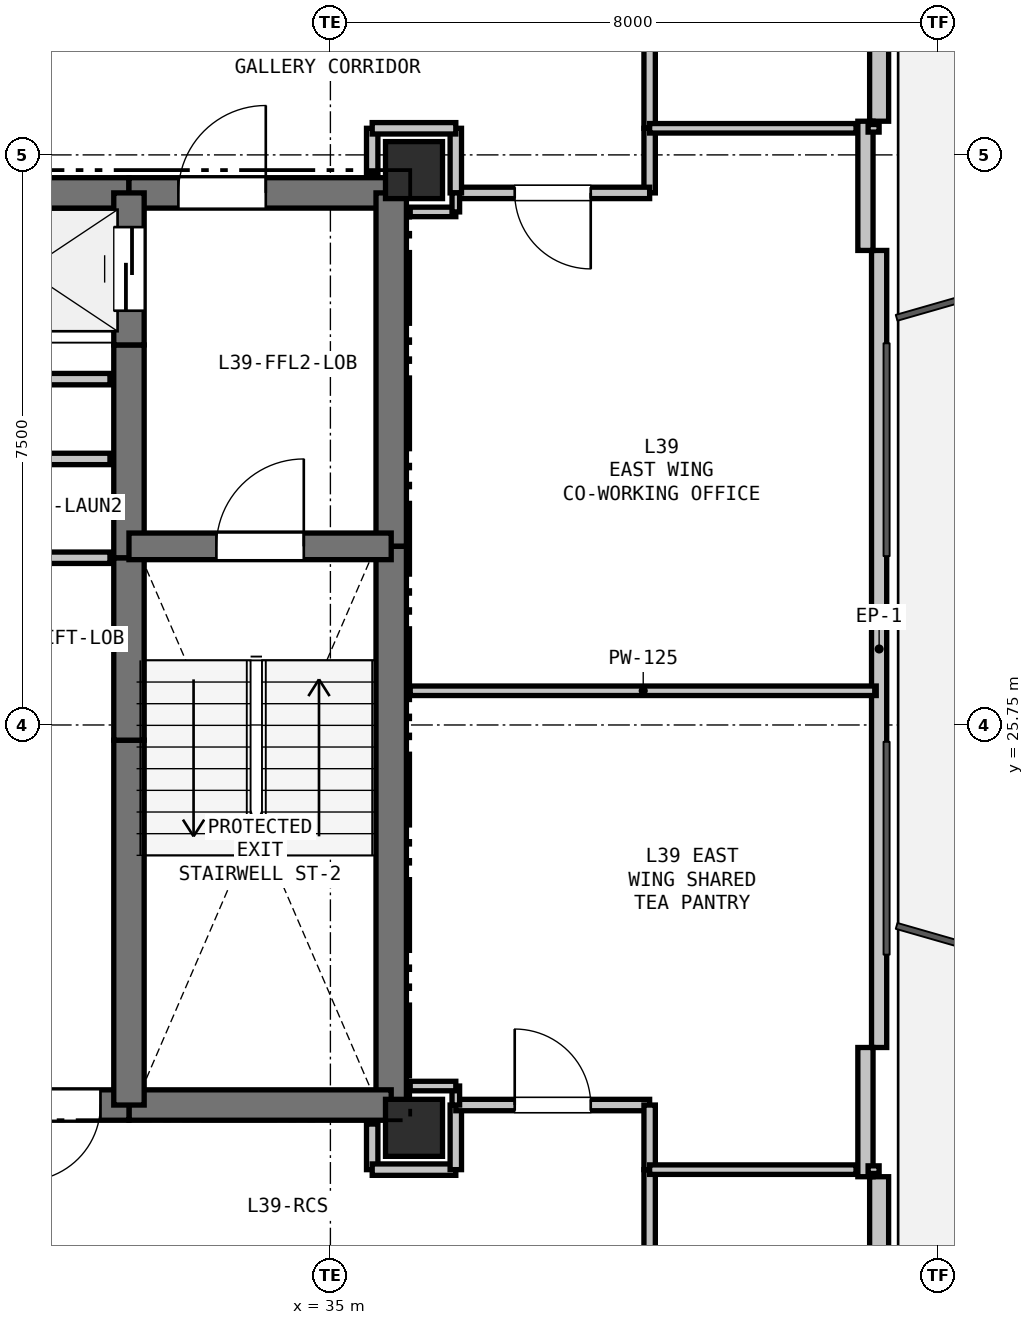
"""IFC4 building model, lengths in metres.
Left out: names, types, materials, properties, quantities, classifications, styles, units other than length and angle.
Written with IfcOpenShell. Run it as: python <this file> out.ifc"""

import sys

from ifc_helpers import new_model, si_unit, direction, frame, frame_2d, origin, origin_2d, place, context, subcontext, project, spatial, rectangle, extrude, element, fill, save


model = new_model("IFC4")
c1 = context("Model", 3, precision=1e-05, world=origin(), true_north=direction((0.0, 1.0)))
c2 = subcontext(c1, "Body", "Model", "MODEL_VIEW")
j1 = project(units=[si_unit("LENGTHUNIT", "METRE"), si_unit("PLANEANGLEUNIT", "RADIAN")], contexts=[c1])
p1 = place(None, origin())
s1 = spatial("IfcSite", under=j1, at=p1, CompositionType="ELEMENT")
p2 = place(p1, origin())
s2 = spatial("IfcBuilding", under=s1, at=p2, CompositionType="ELEMENT")
p3 = place(p2, frame((0.0, 0.0, 141.0)))
s3 = spatial("IfcBuildingStorey", under=s2, at=p3, CompositionType="ELEMENT", Elevation=141.0)
for number, where, z_axis, x_axis in (
    (1, (36.1, 33.05, 0.0), (0.0, 0.0, 1.0), (1.0, 0.0, 0.0)),
    (2, (36.1, 20.45, 0.0), (0.0, 0.0, 1.0), (1.0, 0.0, 0.0)),
):
    element("IfcColumn", number, at=place(p3, frame(where, z_axis=z_axis, x_axis=x_axis)), inside=s3, PredefinedType="COLUMN", context=c2, shape_type="SweptSolid", body=[
        extrude(rectangle(XDim=0.75, YDim=0.75, at=origin_2d()), origin(), (0.0, 0.0, 1.0), 3.3),
    ])
p4 = place(p3, frame((42.219, 44.879, 0.0), z_axis=(0.0, 0.0, 1.0), x_axis=(0.0, -1.0, 0.0)))
e3 = element("IfcWall", 3, at=p4, inside=s3, PredefinedType="SOLIDWALL", context=c2, shape_type="SweptSolid", body=[
    extrude(rectangle(XDim=11.186, YDim=0.25, at=frame_2d((5.593, 0.0))), origin(), (0.0, 0.0, 1.0), 2.68),
])
p5 = place(p4, frame((8.109, 0.0, 0.0)))
e4 = element("IfcOpeningElement", 4, at=p5, cuts=e3, PredefinedType="OPENING", context=c2, shape_type="SweptSolid", body=[
    extrude(rectangle(XDim=1.0, YDim=2.1, at=frame_2d((0.5, 1.05))), frame((0.0, 0.135, 0.0), z_axis=(0.0, -1.0, 0.0), x_axis=(1.0, 0.0, 0.0)), (0.0, 0.0, 1.0), 0.27),
])
p6 = place(p3, frame((42.219, 31.993, 0.0), z_axis=(0.0, 0.0, 1.0), x_axis=(0.0, -1.0, 0.0)))
e5 = element("IfcWall", 5, at=p6, inside=s3, PredefinedType="PARAPET", context=c2, shape_type="SweptSolid", body=[
    extrude(rectangle(XDim=10.486, YDim=0.2, at=frame_2d((5.243, 0.0))), origin(), (0.0, 0.0, 1.0), 0.2),
])
p7 = place(p3, frame((42.219, 19.807, 0.0), z_axis=(0.0, 0.0, 1.0), x_axis=(0.0, -1.0, 0.0)))
e6 = element("IfcWall", 6, at=p7, inside=s3, PredefinedType="SOLIDWALL", context=c2, shape_type="SweptSolid", body=[
    extrude(rectangle(XDim=11.186, YDim=0.25, at=frame_2d((5.593, 0.0))), origin(), (0.0, 0.0, 1.0), 2.68),
])
p8 = place(p7, frame((9.227, 0.0, 0.9)))
e7 = element("IfcOpeningElement", 7, at=p8, cuts=e6, PredefinedType="OPENING", context=c2, shape_type="SweptSolid", body=[
    extrude(rectangle(XDim=1.2, YDim=1.4, at=frame_2d((0.6, 0.7))), frame((0.0, 0.135, 0.0), z_axis=(0.0, -1.0, 0.0), x_axis=(1.0, 0.0, 0.0)), (0.0, 0.0, 1.0), 0.27),
])
for number, where, z_axis, x_axis in (
    (8, (42.039, 33.693, 0.0), (0.0, 0.0, 1.0), (0.0, -1.0, 0.0)),
    (9, (42.039, 21.507, 0.0), (0.0, 0.0, 1.0), (0.0, -1.0, 0.0)),
):
    element("IfcWall", number, at=place(p3, frame(where, z_axis=z_axis, x_axis=x_axis)), inside=s3, PredefinedType="PARAPET", context=c2, shape_type="SweptSolid", body=[
        extrude(rectangle(XDim=1.7, YDim=0.2, at=frame_2d((0.85, 0.0))), origin(), (0.0, 0.0, 1.0), 2.68),
    ])
p9 = place(p3, frame((29.65, 32.75, 0.0), z_axis=(0.0, 0.0, 1.0), x_axis=(1.0, 0.0, 0.0)))
e10 = element("IfcWall", 10, at=p9, inside=s3, PredefinedType="SHEAR", context=c2, shape_type="SweptSolid", body=[
    extrude(rectangle(XDim=2.7, YDim=0.4, at=frame_2d((1.35, 0.0))), origin(), (0.0, 0.0, 1.0), 3.06),
])
p10 = place(p3, frame((32.35, 32.75, 0.0), z_axis=(0.0, 0.0, 1.0), x_axis=(1.0, 0.0, 0.0)))
e11 = element("IfcWall", 11, at=p10, inside=s3, PredefinedType="SHEAR", context=c2, shape_type="SweptSolid", body=[
    extrude(rectangle(XDim=3.45, YDim=0.4, at=frame_2d((1.725, 0.0))), origin(), (0.0, 0.0, 1.0), 3.06),
])
p11 = place(p10, frame((0.65, 0.0, 0.0)))
e12 = element("IfcOpeningElement", 12, at=p11, cuts=e11, PredefinedType="OPENING", context=c2, shape_type="SweptSolid", body=[
    extrude(rectangle(XDim=1.15, YDim=2.15, at=frame_2d((0.575, 1.075))), frame((0.0, 0.21, 0.0), z_axis=(0.0, -1.0, 0.0), x_axis=(1.0, 0.0, 0.0)), (0.0, 0.0, 1.0), 0.42),
])
p12 = place(p3, frame((35.8, 32.75, 0.0), z_axis=(0.0, 0.0, 1.0), x_axis=(0.0, -1.0, 0.0)))
e13 = element("IfcWall", 13, at=p12, inside=s3, PredefinedType="SHEAR", context=c2, shape_type="SweptSolid", body=[
    extrude(rectangle(XDim=4.65, YDim=0.4, at=frame_2d((2.325, 0.0))), origin(), (0.0, 0.0, 1.0), 3.06),
])
p13 = place(p3, frame((35.8, 28.1, 0.0), z_axis=(0.0, 0.0, 1.0), x_axis=(0.0, -1.0, 0.0)))
e14 = element("IfcWall", 14, at=p13, inside=s3, PredefinedType="SHEAR", context=c2, shape_type="SweptSolid", body=[
    extrude(rectangle(XDim=7.35, YDim=0.4, at=frame_2d((3.675, 0.0))), origin(), (0.0, 0.0, 1.0), 3.06),
])
p14 = place(p3, frame((35.8, 20.75, 0.0), z_axis=(0.0, 0.0, 1.0), x_axis=(-1.0, 0.0, 0.0)))
e15 = element("IfcWall", 15, at=p14, inside=s3, PredefinedType="SHEAR", context=c2, shape_type="SweptSolid", body=[
    extrude(rectangle(XDim=3.45, YDim=0.4, at=frame_2d((1.725, 0.0))), origin(), (0.0, 0.0, 1.0), 3.06),
])
p15 = place(p3, frame((32.35, 20.75, 0.0), z_axis=(0.0, 0.0, 1.0), x_axis=(-1.0, 0.0, 0.0)))
e16 = element("IfcWall", 16, at=p15, inside=s3, PredefinedType="SHEAR", context=c2, shape_type="SweptSolid", body=[
    extrude(rectangle(XDim=1.75, YDim=0.4, at=frame_2d((0.875, 0.0))), origin(), (0.0, 0.0, 1.0), 3.06),
])
p16 = place(p15, frame((0.375, 0.0, 0.0)))
e17 = element("IfcOpeningElement", 17, at=p16, cuts=e16, PredefinedType="OPENING", context=c2, shape_type="SweptSolid", body=[
    extrude(rectangle(XDim=1.0, YDim=2.15, at=frame_2d((0.5, 1.075))), frame((0.0, 0.21, 0.0), z_axis=(0.0, -1.0, 0.0), x_axis=(1.0, 0.0, 0.0)), (0.0, 0.0, 1.0), 0.42),
])
p17 = place(p3, frame((32.35, 20.75, 0.0), z_axis=(0.0, 0.0, 1.0), x_axis=(0.0, 1.0, 0.0)))
e18 = element("IfcWall", 18, at=p17, inside=s3, PredefinedType="SHEAR", context=c2, shape_type="SweptSolid", body=[
    extrude(rectangle(XDim=4.8, YDim=0.4, at=frame_2d((2.4, 0.0))), origin(), (0.0, 0.0, 1.0), 3.06),
])
p18 = place(p3, frame((32.35, 25.55, 0.0), z_axis=(0.0, 0.0, 1.0), x_axis=(0.0, 1.0, 0.0)))
e19 = element("IfcWall", 19, at=p18, inside=s3, PredefinedType="SHEAR", context=c2, shape_type="SweptSolid", body=[
    extrude(rectangle(XDim=2.4, YDim=0.4, at=frame_2d((1.2, 0.0))), origin(), (0.0, 0.0, 1.0), 3.06),
])
p19 = place(p3, frame((32.35, 27.95, 0.0), z_axis=(0.0, 0.0, 1.0), x_axis=(0.0, 1.0, 0.0)))
e20 = element("IfcWall", 20, at=p19, inside=s3, PredefinedType="SHEAR", context=c2, shape_type="SweptSolid", body=[
    extrude(rectangle(XDim=2.8, YDim=0.4, at=frame_2d((1.4, 0.0))), origin(), (0.0, 0.0, 1.0), 3.06),
])
p20 = place(p3, frame((32.35, 30.75, 0.0), z_axis=(0.0, 0.0, 1.0), x_axis=(0.0, 1.0, 0.0)))
e21 = element("IfcWall", 21, at=p20, inside=s3, PredefinedType="SHEAR", context=c2, shape_type="SweptSolid", body=[
    extrude(rectangle(XDim=2.0, YDim=0.4, at=frame_2d((1.0, 0.0))), origin(), (0.0, 0.0, 1.0), 3.06),
])
p21 = place(p20, frame((0.45, 0.0, 0.0)))
e22 = element("IfcOpeningElement", 22, at=p21, cuts=e21, PredefinedType="OPENING", context=c2, shape_type="SweptSolid", body=[
    extrude(rectangle(XDim=1.1, YDim=2.15, at=frame_2d((0.55, 1.075))), frame((0.0, 0.21, 0.0), z_axis=(0.0, -1.0, 0.0), x_axis=(1.0, 0.0, 0.0)), (0.0, 0.0, 1.0), 0.42),
])
p22 = place(p3, frame((32.35, 28.1, 0.0), z_axis=(0.0, 0.0, 1.0), x_axis=(1.0, 0.0, 0.0)))
e23 = element("IfcWall", 23, at=p22, inside=s3, PredefinedType="SHEAR", context=c2, shape_type="SweptSolid", body=[
    extrude(rectangle(XDim=3.45, YDim=0.35, at=frame_2d((1.725, 0.0))), origin(), (0.0, 0.0, 1.0), 3.06),
])
p23 = place(p22, frame((1.15, 0.0, 0.0)))
e24 = element("IfcOpeningElement", 24, at=p23, cuts=e23, PredefinedType="OPENING", context=c2, shape_type="SweptSolid", body=[
    extrude(rectangle(XDim=1.15, YDim=2.15, at=frame_2d((0.575, 1.075))), frame((0.0, 0.185, 0.0), z_axis=(0.0, -1.0, 0.0), x_axis=(1.0, 0.0, 0.0)), (0.0, 0.0, 1.0), 0.37),
])
p24 = place(p3, frame((32.1, 30.3, 0.0), z_axis=(0.0, 0.0, 1.0), x_axis=(-1.0, 0.0, 0.0)))
e25 = element("IfcWall", 25, at=p24, inside=s3, PredefinedType="PARTITIONING", context=c2, shape_type="SweptSolid", body=[
    extrude(rectangle(XDim=2.45, YDim=0.15, at=frame_2d((1.225, 0.0))), origin(), (0.0, 0.0, 1.0), 3.06),
])
p25 = place(p3, frame((27.4, 27.95, 0.0), z_axis=(0.0, 0.0, 1.0), x_axis=(1.0, 0.0, 0.0)))
e26 = element("IfcWall", 26, at=p25, inside=s3, PredefinedType="PARTITIONING", context=c2, shape_type="SweptSolid", body=[
    extrude(rectangle(XDim=4.7, YDim=0.15, at=frame_2d((2.35, 0.0))), origin(), (0.0, 0.0, 1.0), 3.06),
])
p26 = place(p25, frame((1.85, 0.0, 0.0)))
e27 = element("IfcOpeningElement", 27, at=p26, cuts=e26, PredefinedType="OPENING", context=c2, shape_type="SweptSolid", body=[
    extrude(rectangle(XDim=1.0, YDim=2.15, at=frame_2d((0.5, 1.075))), frame((0.0, 0.085, 0.0), z_axis=(0.0, -1.0, 0.0), x_axis=(1.0, 0.0, 0.0)), (0.0, 0.0, 1.0), 0.17),
])
p27 = place(p3, frame((35.55, 33.6, 0.0), z_axis=(0.0, 0.0, 1.0), x_axis=(0.0, -1.0, 0.0)))
e28 = element("IfcWall", 28, at=p27, inside=s3, PredefinedType="PARTITIONING", context=c2, shape_type="SweptSolid", body=[
    extrude(rectangle(XDim=0.6, YDim=0.15, at=frame_2d((0.3, 0.0))), origin(), (0.0, 0.0, 1.0), 2.585),
])
p28 = place(p3, frame((39.2, 35.35, 0.0), z_axis=(0.0, 0.0, 1.0), x_axis=(0.0, -1.0, 0.0)))
e29 = element("IfcWall", 29, at=p28, inside=s3, PredefinedType="PARTITIONING", context=c2, shape_type="SweptSolid", body=[
    extrude(rectangle(XDim=1.75, YDim=0.15, at=frame_2d((0.875, 0.0))), origin(), (0.0, 0.0, 1.0), 3.06),
])
p29 = place(p3, frame((39.2, 33.6, 0.0), z_axis=(0.0, 0.0, 1.0), x_axis=(0.0, -1.0, 0.0)))
e30 = element("IfcWall", 30, at=p29, inside=s3, PredefinedType="PARTITIONING", context=c2, shape_type="SweptSolid", body=[
    extrude(rectangle(XDim=0.85, YDim=0.15, at=frame_2d((0.425, 0.0))), origin(), (0.0, 0.0, 1.0), 3.06),
])
p30 = place(p3, frame((39.2, 32.75, 0.0), z_axis=(0.0, 0.0, 1.0), x_axis=(-1.0, 0.0, 0.0)))
e31 = element("IfcWall", 31, at=p30, inside=s3, PredefinedType="PARTITIONING", context=c2, shape_type="SweptSolid", body=[
    extrude(rectangle(XDim=2.55, YDim=0.15, at=frame_2d((1.275, 0.0))), origin(), (0.0, 0.0, 1.0), 3.06),
])
p31 = place(p30, frame((0.775, 0.0, 0.0)))
e32 = element("IfcOpeningElement", 32, at=p31, cuts=e31, PredefinedType="OPENING", context=c2, shape_type="SweptSolid", body=[
    extrude(rectangle(XDim=1.0, YDim=2.15, at=frame_2d((0.5, 1.075))), frame((0.0, 0.085, 0.0), z_axis=(0.0, -1.0, 0.0), x_axis=(1.0, 0.0, 0.0)), (0.0, 0.0, 1.0), 0.17),
])
p32 = place(p3, frame((36.65, 32.75, 0.0), z_axis=(0.0, 0.0, 1.0), x_axis=(0.0, 1.0, 0.0)))
e33 = element("IfcWall", 33, at=p32, inside=s3, PredefinedType="PARTITIONING", context=c2, shape_type="SweptSolid", body=[
    extrude(rectangle(XDim=0.85, YDim=0.15, at=frame_2d((0.425, 0.0))), origin(), (0.0, 0.0, 1.0), 2.433),
])
p33 = place(p3, frame((36.65, 33.6, 0.0), z_axis=(0.0, 0.0, 1.0), x_axis=(-1.0, 0.0, 0.0)))
e34 = element("IfcWall", 34, at=p33, inside=s3, PredefinedType="PARTITIONING", context=c2, shape_type="SweptSolid", body=[
    extrude(rectangle(XDim=1.1, YDim=0.15, at=frame_2d((0.55, 0.0))), origin(), (0.0, 0.0, 1.0), 2.433),
])
p34 = place(p3, frame((35.55, 20.5, 0.0), z_axis=(0.0, 0.0, 1.0), x_axis=(0.0, -1.0, 0.0)))
e35 = element("IfcWall", 35, at=p34, inside=s3, PredefinedType="PARTITIONING", context=c2, shape_type="SweptSolid", body=[
    extrude(rectangle(XDim=0.6, YDim=0.15, at=frame_2d((0.3, 0.0))), origin(), (0.0, 0.0, 1.0), 2.585),
])
p35 = place(p3, frame((35.55, 19.9, 0.0), z_axis=(0.0, 0.0, 1.0), x_axis=(1.0, 0.0, 0.0)))
e36 = element("IfcWall", 36, at=p35, inside=s3, PredefinedType="PARTITIONING", context=c2, shape_type="SweptSolid", body=[
    extrude(rectangle(XDim=1.1, YDim=0.15, at=frame_2d((0.55, 0.0))), origin(), (0.0, 0.0, 1.0), 2.433),
])
p36 = place(p3, frame((36.65, 19.9, 0.0), z_axis=(0.0, 0.0, 1.0), x_axis=(0.0, 1.0, 0.0)))
e37 = element("IfcWall", 37, at=p36, inside=s3, PredefinedType="PARTITIONING", context=c2, shape_type="SweptSolid", body=[
    extrude(rectangle(XDim=0.85, YDim=0.15, at=frame_2d((0.425, 0.0))), origin(), (0.0, 0.0, 1.0), 3.06),
])
p37 = place(p3, frame((36.65, 20.75, 0.0), z_axis=(0.0, 0.0, 1.0), x_axis=(1.0, 0.0, 0.0)))
e38 = element("IfcWall", 38, at=p37, inside=s3, PredefinedType="PARTITIONING", context=c2, shape_type="SweptSolid", body=[
    extrude(rectangle(XDim=2.55, YDim=0.15, at=frame_2d((1.275, 0.0))), origin(), (0.0, 0.0, 1.0), 3.06),
])
p38 = place(p37, frame((0.775, 0.0, 0.0)))
e39 = element("IfcOpeningElement", 39, at=p38, cuts=e38, PredefinedType="OPENING", context=c2, shape_type="SweptSolid", body=[
    extrude(rectangle(XDim=1.0, YDim=2.15, at=frame_2d((0.5, 1.075))), frame((0.0, 0.085, 0.0), z_axis=(0.0, -1.0, 0.0), x_axis=(1.0, 0.0, 0.0)), (0.0, 0.0, 1.0), 0.17),
])
p39 = place(p3, frame((39.2, 20.75, 0.0), z_axis=(0.0, 0.0, 1.0), x_axis=(0.0, -1.0, 0.0)))
e40 = element("IfcWall", 40, at=p39, inside=s3, PredefinedType="PARTITIONING", context=c2, shape_type="SweptSolid", body=[
    extrude(rectangle(XDim=0.85, YDim=0.15, at=frame_2d((0.425, 0.0))), origin(), (0.0, 0.0, 1.0), 3.06),
])
p40 = place(p3, frame((39.2, 19.9, 0.0), z_axis=(0.0, 0.0, 1.0), x_axis=(0.0, -1.0, 0.0)))
e41 = element("IfcWall", 41, at=p40, inside=s3, PredefinedType="PARTITIONING", context=c2, shape_type="SweptSolid", body=[
    extrude(rectangle(XDim=1.75, YDim=0.15, at=frame_2d((0.875, 0.0))), origin(), (0.0, 0.0, 1.0), 3.06),
])
p41 = place(p3, frame((32.1, 29.25, 0.0), z_axis=(0.0, 0.0, 1.0), x_axis=(-1.0, 0.0, 0.0)))
e42 = element("IfcWall", 42, at=p41, inside=s3, PredefinedType="PARTITIONING", context=c2, shape_type="SweptSolid", body=[
    extrude(rectangle(XDim=4.7, YDim=0.15, at=frame_2d((2.35, 0.0))), origin(), (0.0, 0.0, 1.0), 3.06),
])
p42 = place(p3, frame((36.05, 32.5, 0.0), z_axis=(0.0, 0.0, 1.0), x_axis=(1.0, 0.0, 0.0)))
e43 = element("IfcWall", 43, at=p42, inside=s3, PredefinedType="PARTITIONING", context=c2, shape_type="SweptSolid", body=[
    extrude(rectangle(XDim=0.6, YDim=0.125, at=frame_2d((0.3, 0.0))), origin(), (0.0, 0.0, 1.0), 2.585),
])
p43 = place(p3, frame((36.65, 32.5, 0.0), z_axis=(0.0, 0.0, 1.0), x_axis=(0.0, 1.0, 0.0)))
e44 = element("IfcWall", 44, at=p43, inside=s3, PredefinedType="PARTITIONING", context=c2, shape_type="SweptSolid", body=[
    extrude(rectangle(XDim=0.25, YDim=0.1, at=frame_2d((0.125, 0.0))), origin(), (0.0, 0.0, 1.0), 3.06),
])
p44 = place(p3, frame((39.2, 33.6, 0.0), z_axis=(0.0, 0.0, 1.0), x_axis=(1.0, 0.0, 0.0)))
e45 = element("IfcWall", 45, at=p44, inside=s3, PredefinedType="PARTITIONING", context=c2, shape_type="SweptSolid", body=[
    extrude(rectangle(XDim=2.715, YDim=0.125, at=frame_2d((1.358, 0.0))), origin(), (0.0, 0.0, 1.0), 2.365),
])
p45 = place(p3, frame((42.074, 33.6, 0.0), z_axis=(0.0, 0.0, 1.0), x_axis=(1.0, 0.0, 0.0)))
e46 = element("IfcWall", 46, at=p45, inside=s3, PredefinedType="PARTITIONING", context=c2, shape_type="SweptSolid", body=[
    extrude(rectangle(XDim=0.145, YDim=0.1, at=frame_2d((0.072, 0.0))), origin(), (0.0, 0.0, 1.0), 3.06),
])
p46 = place(p3, frame((42.181, 26.2, 0.0), z_axis=(0.0, 0.0, 1.0), x_axis=(-1.0, 0.0, 0.0)))
e47 = element("IfcWall", 47, at=p46, inside=s3, PredefinedType="PARTITIONING", context=c2, shape_type="SweptSolid", body=[
    extrude(rectangle(XDim=6.131, YDim=0.125, at=frame_2d((3.065, 0.0))), origin(), (0.0, 0.0, 1.0), 2.365),
])
p47 = place(p3, frame((36.65, 20.75, 0.0), z_axis=(0.0, 0.0, 1.0), x_axis=(0.0, 1.0, 0.0)))
e48 = element("IfcWall", 48, at=p47, inside=s3, PredefinedType="PARTITIONING", context=c2, shape_type="SweptSolid", body=[
    extrude(rectangle(XDim=0.25, YDim=0.1, at=frame_2d((0.125, 0.0))), origin(), (0.0, 0.0, 1.0), 3.06),
])
p48 = place(p3, frame((36.65, 21.0, 0.0), z_axis=(0.0, 0.0, 1.0), x_axis=(-1.0, 0.0, 0.0)))
e49 = element("IfcWall", 49, at=p48, inside=s3, PredefinedType="PARTITIONING", context=c2, shape_type="SweptSolid", body=[
    extrude(rectangle(XDim=0.6, YDim=0.125, at=frame_2d((0.3, 0.0))), origin(), (0.0, 0.0, 1.0), 2.585),
])
p49 = place(p3, frame((42.219, 19.9, 0.0), z_axis=(0.0, 0.0, 1.0), x_axis=(-1.0, 0.0, 0.0)))
e50 = element("IfcWall", 50, at=p49, inside=s3, PredefinedType="PARTITIONING", context=c2, shape_type="SweptSolid", body=[
    extrude(rectangle(XDim=0.145, YDim=0.1, at=frame_2d((0.072, 0.0))), origin(), (0.0, 0.0, 1.0), 3.06),
])
p50 = place(p3, frame((41.915, 19.9, 0.0), z_axis=(0.0, 0.0, 1.0), x_axis=(-1.0, 0.0, 0.0)))
e51 = element("IfcWall", 51, at=p50, inside=s3, PredefinedType="PARTITIONING", context=c2, shape_type="SweptSolid", body=[
    extrude(rectangle(XDim=2.715, YDim=0.125, at=frame_2d((1.358, 0.0))), origin(), (0.0, 0.0, 1.0), 2.365),
])
p51 = place(p16, origin())
e52 = element("IfcDoor", 52, at=p51, inside=s3, OperationType="SINGLE_SWING_RIGHT", PredefinedType="DOOR", context=c2, shape_type="SweptSolid", body=[
    extrude(rectangle(XDim=1.0, YDim=2.15, at=frame_2d((0.5, 1.075))), frame((0.0, 0.025, 0.0), z_axis=(0.0, -1.0, 0.0), x_axis=(1.0, 0.0, 0.0)), (0.0, 0.0, 1.0), 0.05),
])
fill(e17, e52)
p52 = place(p21, origin())
e53 = element("IfcDoor", 53, at=p52, inside=s3, OperationType="SLIDING_TO_LEFT", PredefinedType="DOOR", context=c2, shape_type="SweptSolid", body=[
    extrude(rectangle(XDim=1.1, YDim=2.15, at=frame_2d((0.55, 1.075))), frame((0.0, 0.025, 0.0), z_axis=(0.0, -1.0, 0.0), x_axis=(1.0, 0.0, 0.0)), (0.0, 0.0, 1.0), 0.05),
])
fill(e22, e53)
p53 = place(p23, origin())
e54 = element("IfcDoor", 54, at=p53, inside=s3, OperationType="SINGLE_SWING_RIGHT", PredefinedType="DOOR", context=c2, shape_type="SweptSolid", body=[
    extrude(rectangle(XDim=1.15, YDim=2.15, at=frame_2d((0.575, 1.075))), frame((0.0, 0.025, 0.0), z_axis=(0.0, -1.0, 0.0), x_axis=(1.0, 0.0, 0.0)), (0.0, 0.0, 1.0), 0.05),
])
fill(e24, e54)
p54 = place(p11, origin())
e55 = element("IfcDoor", 55, at=p54, inside=s3, OperationType="SINGLE_SWING_RIGHT", PredefinedType="DOOR", context=c2, shape_type="SweptSolid", body=[
    extrude(rectangle(XDim=1.15, YDim=2.15, at=frame_2d((0.575, 1.075))), frame((0.0, 0.025, 0.0), z_axis=(0.0, -1.0, 0.0), x_axis=(1.0, 0.0, 0.0)), (0.0, 0.0, 1.0), 0.05),
])
fill(e12, e55)
p55 = place(p31, origin())
e56 = element("IfcDoor", 56, at=p55, inside=s3, OperationType="SINGLE_SWING_LEFT", PredefinedType="DOOR", context=c2, shape_type="SweptSolid", body=[
    extrude(rectangle(XDim=1.0, YDim=2.15, at=frame_2d((0.5, 1.075))), frame((0.0, 0.025, 0.0), z_axis=(0.0, -1.0, 0.0), x_axis=(1.0, 0.0, 0.0)), (0.0, 0.0, 1.0), 0.05),
])
fill(e32, e56)
p56 = place(p38, origin())
e57 = element("IfcDoor", 57, at=p56, inside=s3, OperationType="SINGLE_SWING_LEFT", PredefinedType="DOOR", context=c2, shape_type="SweptSolid", body=[
    extrude(rectangle(XDim=1.0, YDim=2.15, at=frame_2d((0.5, 1.075))), frame((0.0, 0.025, 0.0), z_axis=(0.0, -1.0, 0.0), x_axis=(1.0, 0.0, 0.0)), (0.0, 0.0, 1.0), 0.05),
])
fill(e39, e57)
save(model, sys.argv[1])
